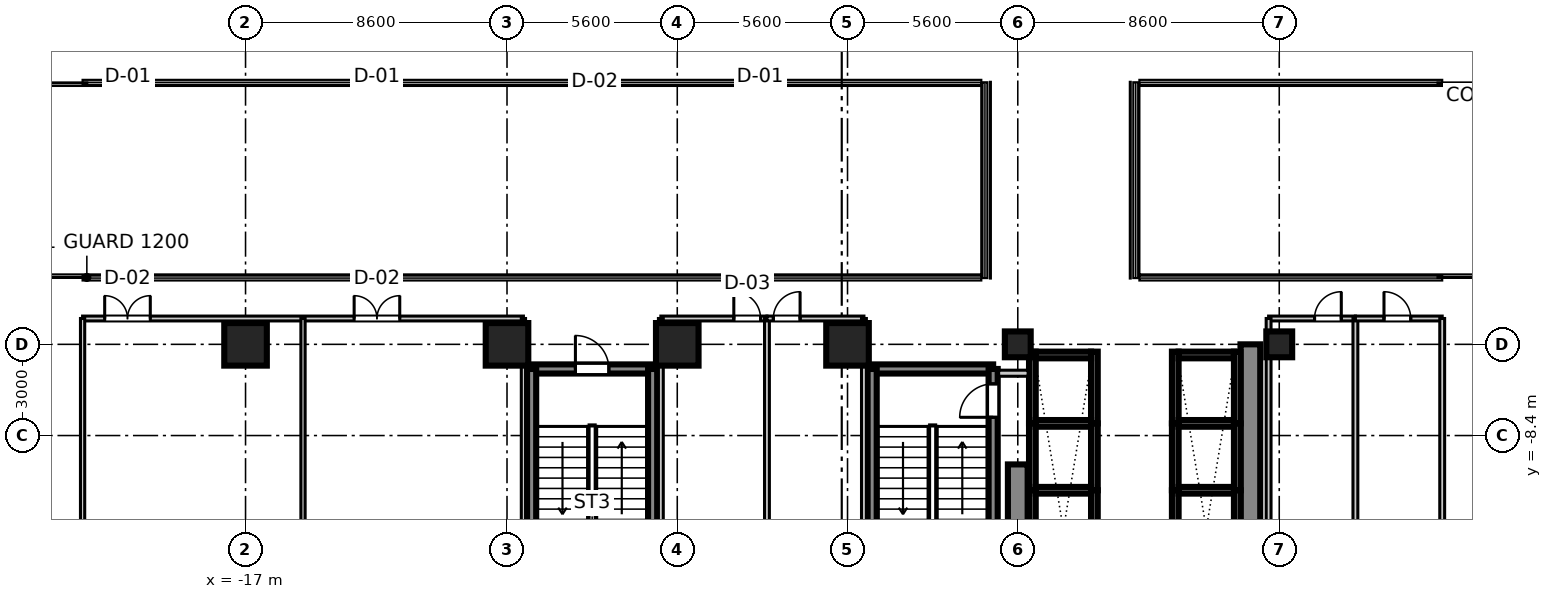
"""IFC4 building model, lengths in metres.
Left out: names, types, materials, properties, quantities, classifications, styles, units other than length and angle.
Written with IfcOpenShell. Run it as: python <this file> out.ifc"""

import sys

from ifc_helpers import new_model, si_unit, direction, frame, frame_2d, origin, origin_2d, place, context, subcontext, project, spatial, rectangle, extrude, source, transform, mapped, element, fill, save


model = new_model("IFC4")
c1 = context("Model", 3, precision=1e-05, world=origin(), true_north=direction((0.0, 1.0)))
c2 = subcontext(c1, "Body", "Model", "MODEL_VIEW")
j1 = project(units=[si_unit("LENGTHUNIT", "METRE"), si_unit("PLANEANGLEUNIT", "RADIAN")], contexts=[c1])
p1 = place(None, origin())
s1 = spatial("IfcSite", under=j1, at=p1, CompositionType="ELEMENT")
p2 = place(p1, origin())
s2 = spatial("IfcBuilding", under=s1, at=p2, CompositionType="ELEMENT")
p3 = place(p2, frame((0.0, 0.0, 61.6)))
s3 = spatial("IfcBuildingStorey", under=s2, at=p3, CompositionType="ELEMENT", Elevation=61.6)
m1 = source(origin(), c2, "Body", "SweptSolid", [
    extrude(rectangle(XDim=1.4, YDim=1.4, at=origin_2d()), origin(), (0.0, 0.0, 1.0), 3.605),
])
for number, where, z_axis, x_axis in (
    (1, (-17.0, -5.4, 0.0), (0.0, 0.0, 1.0), (1.0, 0.0, 0.0)),
    (2, (-8.4, -5.4, 0.0), (0.0, 0.0, 1.0), (1.0, 0.0, 0.0)),
    (3, (-2.8, -5.4, 0.0), (0.0, 0.0, 1.0), (1.0, 0.0, 0.0)),
    (4, (2.8, -5.4, 0.0), (0.0, 0.0, 1.0), (1.0, 0.0, 0.0)),
):
    element("IfcColumn", number, at=place(p3, frame(where, z_axis=z_axis, x_axis=x_axis)), inside=s3, PredefinedType="COLUMN", context=c2, shape_type="MappedRepresentation", body=[
        mapped(m1, transform((0.0, 0.0, 0.0), scale=1.0)),
    ])
m2 = source(origin(), c2, "Body", "SweptSolid", [
    extrude(rectangle(XDim=0.85, YDim=0.85, at=origin_2d()), origin(), (0.0, 0.0, 1.0), 3.605),
])
for number, where, z_axis, x_axis in (
    (5, (8.4, -5.4, 0.0), (0.0, 0.0, 1.0), (1.0, 0.0, 0.0)),
    (6, (17.0, -5.4, 0.0), (0.0, 0.0, 1.0), (1.0, 0.0, 0.0)),
):
    element("IfcColumn", number, at=place(p3, frame(where, z_axis=z_axis, x_axis=x_axis)), inside=s3, PredefinedType="PILASTER", context=c2, shape_type="MappedRepresentation", body=[
        mapped(m2, transform((0.0, 0.0, 0.0), scale=1.0)),
    ])
m3 = source(origin(), c2, "Body", "SweptSolid", [
    extrude(rectangle(XDim=7.65, YDim=0.65, at=frame_2d((3.825, 0.0))), origin(), (0.0, 0.0, 1.0), 3.37),
])
p4 = place(p3, frame((8.4, -17.0, 0.0), z_axis=(0.0, 0.0, 1.0), x_axis=(0.0, 1.0, 0.0)))
e7 = element("IfcWall", 7, at=p4, inside=s3, PredefinedType="SHEAR", context=c2, shape_type="MappedRepresentation", body=[
    mapped(m3, transform((0.0, 0.0, 0.0), scale=1.0)),
])
m4 = source(origin(), c2, "Body", "SweptSolid", [
    extrude(rectangle(XDim=11.6, YDim=0.65, at=frame_2d((5.8, 0.0))), origin(), (0.0, 0.0, 1.0), 3.37),
])
p5 = place(p3, frame((16.05, -17.0, 0.0), z_axis=(0.0, 0.0, 1.0), x_axis=(0.0, 1.0, 0.0)))
e8 = element("IfcWall", 8, at=p5, inside=s3, PredefinedType="SHEAR", context=c2, shape_type="MappedRepresentation", body=[
    mapped(m4, transform((0.0, 0.0, 0.0), scale=1.0)),
])
m5 = source(origin(), c2, "Body", "SweptSolid", [
    extrude(rectangle(XDim=3.98, YDim=0.3, at=frame_2d((1.99, 0.0))), origin(), (0.0, 0.0, 1.0), 3.37),
])
p6 = place(p3, frame((3.61, -6.21, 0.0), z_axis=(0.0, 0.0, 1.0), x_axis=(1.0, 0.0, 0.0)))
e9 = element("IfcWall", 9, at=p6, inside=s3, PredefinedType="SHEAR", context=c2, shape_type="MappedRepresentation", body=[
    mapped(m5, transform((0.0, 0.0, 0.0), scale=1.0)),
])
m6 = source(origin(), c2, "Body", "SweptSolid", [
    extrude(rectangle(XDim=9.38, YDim=0.3, at=frame_2d((4.69, 0.0))), origin(), (0.0, 0.0, 1.0), 3.37),
])
p7 = place(p3, frame((3.61, -15.59, 0.0), z_axis=(0.0, 0.0, 1.0), x_axis=(0.0, 1.0, 0.0)))
e10 = element("IfcWall", 10, at=p7, inside=s3, PredefinedType="SHEAR", context=c2, shape_type="MappedRepresentation", body=[
    mapped(m6, transform((0.0, 0.0, 0.0), scale=1.0)),
])
p8 = place(p3, frame((7.59, -15.59, 0.0), z_axis=(0.0, 0.0, 1.0), x_axis=(0.0, 1.0, 0.0)))
e11 = element("IfcWall", 11, at=p8, inside=s3, PredefinedType="SHEAR", context=c2, shape_type="MappedRepresentation", body=[
    mapped(m6, transform((0.0, 0.0, 0.0), scale=1.0)),
])
p9 = place(p8, frame((7.79, 0.0, 0.0)))
e12 = element("IfcOpeningElement", 12, at=p9, cuts=e11, PredefinedType="OPENING", context=c2, shape_type="SweptSolid", body=[
    extrude(rectangle(XDim=1.1, YDim=2.15, at=frame_2d((0.55, 1.075))), frame((0.0, 0.16, 0.0), z_axis=(0.0, -1.0, 0.0), x_axis=(1.0, 0.0, 0.0)), (0.0, 0.0, 1.0), 0.32),
])
p10 = place(p3, frame((-7.59, -6.21, 0.0), z_axis=(0.0, 0.0, 1.0), x_axis=(1.0, 0.0, 0.0)))
e13 = element("IfcWall", 13, at=p10, inside=s3, PredefinedType="SHEAR", context=c2, shape_type="MappedRepresentation", body=[
    mapped(m5, transform((0.0, 0.0, 0.0), scale=1.0)),
])
p11 = place(p10, frame((1.44, 0.0, 0.0)))
e14 = element("IfcOpeningElement", 14, at=p11, cuts=e13, PredefinedType="OPENING", context=c2, shape_type="SweptSolid", body=[
    extrude(rectangle(XDim=1.1, YDim=2.15, at=frame_2d((0.55, 1.075))), frame((0.0, 0.16, 0.0), z_axis=(0.0, -1.0, 0.0), x_axis=(1.0, 0.0, 0.0)), (0.0, 0.0, 1.0), 0.32),
])
for number, where, z_axis, x_axis in (
    (15, (-7.59, -15.59, 0.0), (0.0, 0.0, 1.0), (0.0, 1.0, 0.0)),
    (16, (-3.61, -15.59, 0.0), (0.0, 0.0, 1.0), (0.0, 1.0, 0.0)),
):
    element("IfcWall", number, at=place(p3, frame(where, z_axis=z_axis, x_axis=x_axis)), inside=s3, PredefinedType="SHEAR", context=c2, shape_type="MappedRepresentation", body=[
        mapped(m6, transform((0.0, 0.0, 0.0), scale=1.0)),
    ])
m7 = source(origin(), c2, "Body", "SweptSolid", [
    extrude(rectangle(XDim=2.36, YDim=0.22, at=frame_2d((1.18, 0.0))), origin(), (0.0, 0.0, 1.0), 3.37),
])
for number, where, z_axis, x_axis in (
    (17, (13.58, -8.0, 0.0), (0.0, 0.0, 1.0), (0.0, 1.0, 0.0)),
    (18, (15.62, -8.0, 0.0), (0.0, 0.0, 1.0), (0.0, 1.0, 0.0)),
):
    element("IfcWall", number, at=place(p3, frame(where, z_axis=z_axis, x_axis=x_axis)), inside=s3, PredefinedType="SHEAR", context=c2, shape_type="MappedRepresentation", body=[
        mapped(m7, transform((0.0, 0.0, 0.0), scale=1.0)),
    ])
m8 = source(origin(), c2, "Body", "SweptSolid", [
    extrude(rectangle(XDim=1.82, YDim=0.22, at=frame_2d((0.91, 0.0))), origin(), (0.0, 0.0, 1.0), 3.37),
])
p12 = place(p3, frame((13.69, -5.75, 0.0), z_axis=(0.0, 0.0, 1.0), x_axis=(1.0, 0.0, 0.0)))
e19 = element("IfcWall", 19, at=p12, inside=s3, PredefinedType="SHEAR", context=c2, shape_type="MappedRepresentation", body=[
    mapped(m8, transform((0.0, 0.0, 0.0), scale=1.0)),
])
m9 = source(origin(), c2, "Body", "SweptSolid", [
    extrude(rectangle(XDim=2.2, YDim=0.22, at=frame_2d((1.1, 0.0))), origin(), (0.0, 0.0, 1.0), 3.37),
])
for number, where, z_axis, x_axis in (
    (20, (13.58, -10.2, 0.0), (0.0, 0.0, 1.0), (0.0, 1.0, 0.0)),
    (21, (15.62, -10.2, 0.0), (0.0, 0.0, 1.0), (0.0, 1.0, 0.0)),
):
    element("IfcWall", number, at=place(p3, frame(where, z_axis=z_axis, x_axis=x_axis)), inside=s3, PredefinedType="SHEAR", context=c2, shape_type="MappedRepresentation", body=[
        mapped(m9, transform((0.0, 0.0, 0.0), scale=1.0)),
    ])
m10 = source(origin(), c2, "Body", "SweptSolid", [
    extrude(rectangle(XDim=1.82, YDim=0.22, at=frame_2d((0.91, 0.0))), origin(), (0.0, 0.0, 1.0), 3.65),
])
p13 = place(p3, frame((13.69, -8.0, 0.0), z_axis=(0.0, 0.0, 1.0), x_axis=(1.0, 0.0, 0.0)))
e22 = element("IfcWall", 22, at=p13, inside=s3, PredefinedType="SHEAR", context=c2, shape_type="MappedRepresentation", body=[
    mapped(m10, transform((0.0, 0.0, 0.0), scale=1.0)),
])
for number, where, z_axis, x_axis in (
    (23, (13.58, -12.4, 0.0), (0.0, 0.0, 1.0), (0.0, 1.0, 0.0)),
    (24, (15.62, -12.4, 0.0), (0.0, 0.0, 1.0), (0.0, 1.0, 0.0)),
):
    element("IfcWall", number, at=place(p3, frame(where, z_axis=z_axis, x_axis=x_axis)), inside=s3, PredefinedType="SHEAR", context=c2, shape_type="MappedRepresentation", body=[
        mapped(m9, transform((0.0, 0.0, 0.0), scale=1.0)),
    ])
p14 = place(p3, frame((13.69, -10.2, 0.0), z_axis=(0.0, 0.0, 1.0), x_axis=(1.0, 0.0, 0.0)))
e25 = element("IfcWall", 25, at=p14, inside=s3, PredefinedType="SHEAR", context=c2, shape_type="MappedRepresentation", body=[
    mapped(m10, transform((0.0, 0.0, 0.0), scale=1.0)),
])
for number, where, z_axis, x_axis in (
    (26, (8.88, -8.0, 0.0), (0.0, 0.0, 1.0), (0.0, 1.0, 0.0)),
    (27, (10.92, -8.0, 0.0), (0.0, 0.0, 1.0), (0.0, 1.0, 0.0)),
):
    element("IfcWall", number, at=place(p3, frame(where, z_axis=z_axis, x_axis=x_axis)), inside=s3, PredefinedType="SHEAR", context=c2, shape_type="MappedRepresentation", body=[
        mapped(m7, transform((0.0, 0.0, 0.0), scale=1.0)),
    ])
p15 = place(p3, frame((8.99, -5.75, 0.0), z_axis=(0.0, 0.0, 1.0), x_axis=(1.0, 0.0, 0.0)))
e28 = element("IfcWall", 28, at=p15, inside=s3, PredefinedType="SHEAR", context=c2, shape_type="MappedRepresentation", body=[
    mapped(m8, transform((0.0, 0.0, 0.0), scale=1.0)),
])
for number, where, z_axis, x_axis in (
    (29, (8.88, -10.2, 0.0), (0.0, 0.0, 1.0), (0.0, 1.0, 0.0)),
    (30, (10.92, -10.2, 0.0), (0.0, 0.0, 1.0), (0.0, 1.0, 0.0)),
):
    element("IfcWall", number, at=place(p3, frame(where, z_axis=z_axis, x_axis=x_axis)), inside=s3, PredefinedType="SHEAR", context=c2, shape_type="MappedRepresentation", body=[
        mapped(m9, transform((0.0, 0.0, 0.0), scale=1.0)),
    ])
p16 = place(p3, frame((8.99, -8.0, 0.0), z_axis=(0.0, 0.0, 1.0), x_axis=(1.0, 0.0, 0.0)))
e31 = element("IfcWall", 31, at=p16, inside=s3, PredefinedType="SHEAR", context=c2, shape_type="MappedRepresentation", body=[
    mapped(m10, transform((0.0, 0.0, 0.0), scale=1.0)),
])
for number, where, z_axis, x_axis in (
    (32, (8.88, -12.4, 0.0), (0.0, 0.0, 1.0), (0.0, 1.0, 0.0)),
    (33, (10.92, -12.4, 0.0), (0.0, 0.0, 1.0), (0.0, 1.0, 0.0)),
):
    element("IfcWall", number, at=place(p3, frame(where, z_axis=z_axis, x_axis=x_axis)), inside=s3, PredefinedType="SHEAR", context=c2, shape_type="MappedRepresentation", body=[
        mapped(m9, transform((0.0, 0.0, 0.0), scale=1.0)),
    ])
p17 = place(p3, frame((8.99, -10.2, 0.0), z_axis=(0.0, 0.0, 1.0), x_axis=(1.0, 0.0, 0.0)))
e34 = element("IfcWall", 34, at=p17, inside=s3, PredefinedType="SHEAR", context=c2, shape_type="MappedRepresentation", body=[
    mapped(m10, transform((0.0, 0.0, 0.0), scale=1.0)),
])
m11 = source(origin(), c2, "Body", "SweptSolid", [
    extrude(rectangle(XDim=0.97, YDim=0.2, at=frame_2d((0.485, 0.0))), origin(), (0.0, 0.0, 1.0), 2.71),
])
p18 = place(p3, frame((7.77, -6.35, 0.0), z_axis=(0.0, 0.0, 1.0), x_axis=(1.0, 0.0, 0.0)))
e35 = element("IfcWall", 35, at=p18, inside=s3, PredefinedType="PARTITIONING", context=c2, shape_type="MappedRepresentation", body=[
    mapped(m11, transform((0.0, 0.0, 0.0), scale=1.0)),
])
m12 = source(origin(), c2, "Body", "SweptSolid", [
    extrude(rectangle(XDim=2.855, YDim=0.16, at=frame_2d((1.427, 0.0))), origin(), (0.0, 0.0, 1.0), 2.71),
])
p19 = place(p3, frame((16.65, -4.55, 0.0), z_axis=(0.0, 0.0, 1.0), x_axis=(1.0, 0.0, 0.0)))
e36 = element("IfcWall", 36, at=p19, inside=s3, PredefinedType="PARTITIONING", context=c2, shape_type="MappedRepresentation", body=[
    mapped(m12, transform((0.0, 0.0, 0.0), scale=1.0)),
])
p20 = place(p19, frame((1.511, 0.0, 0.0)))
e37 = element("IfcOpeningElement", 37, at=p20, cuts=e36, PredefinedType="OPENING", context=c2, shape_type="SweptSolid", body=[
    extrude(rectangle(XDim=0.88, YDim=2.1, at=frame_2d((0.44, 1.05))), frame((0.0, 0.09, 0.0), z_axis=(0.0, -1.0, 0.0), x_axis=(1.0, 0.0, 0.0)), (0.0, 0.0, 1.0), 0.18),
])
m13 = source(origin(), c2, "Body", "SweptSolid", [
    extrude(rectangle(XDim=20.55, YDim=0.16, at=frame_2d((10.275, 0.0))), origin(), (0.0, 0.0, 1.0), 2.71),
])
for number, where, z_axis, x_axis in (
    (38, (16.65, -25.1, 0.0), (0.0, 0.0, 1.0), (0.0, 1.0, 0.0)),
    (39, (19.505, -25.1, 0.0), (0.0, 0.0, 1.0), (0.0, 1.0, 0.0)),
):
    element("IfcWall", number, at=place(p3, frame(where, z_axis=z_axis, x_axis=x_axis)), inside=s3, PredefinedType="PARTITIONING", context=c2, shape_type="MappedRepresentation", body=[
        mapped(m13, transform((0.0, 0.0, 0.0), scale=1.0)),
    ])
m14 = source(origin(), c2, "Body", "SweptSolid", [
    extrude(rectangle(XDim=2.855, YDim=0.16, at=frame_2d((1.428, 0.0))), origin(), (0.0, 0.0, 1.0), 2.71),
])
p21 = place(p3, frame((19.505, -4.55, 0.0), z_axis=(0.0, 0.0, 1.0), x_axis=(1.0, 0.0, 0.0)))
e40 = element("IfcWall", 40, at=p21, inside=s3, PredefinedType="PARTITIONING", context=c2, shape_type="MappedRepresentation", body=[
    mapped(m14, transform((0.0, 0.0, 0.0), scale=1.0)),
])
p22 = place(p21, frame((0.94, 0.0, 0.0)))
e41 = element("IfcOpeningElement", 41, at=p22, cuts=e40, PredefinedType="OPENING", context=c2, shape_type="SweptSolid", body=[
    extrude(rectangle(XDim=0.88, YDim=2.1, at=frame_2d((0.44, 1.05))), frame((0.0, 0.09, 0.0), z_axis=(0.0, -1.0, 0.0), x_axis=(1.0, 0.0, 0.0)), (0.0, 0.0, 1.0), 0.18),
])
m15 = source(origin(), c2, "Body", "SweptSolid", [
    extrude(rectangle(XDim=19.13, YDim=0.16, at=frame_2d((9.565, 0.0))), origin(), (0.0, 0.0, 1.0), 2.71),
])
p23 = place(p3, frame((22.36, -23.68, 0.0), z_axis=(0.0, 0.0, 1.0), x_axis=(0.0, 1.0, 0.0)))
e42 = element("IfcWall", 42, at=p23, inside=s3, PredefinedType="PARTITIONING", context=c2, shape_type="MappedRepresentation", body=[
    mapped(m15, transform((0.0, 0.0, 0.0), scale=1.0)),
])
m16 = source(origin(), c2, "Body", "SweptSolid", [
    extrude(rectangle(XDim=14.5, YDim=0.16, at=frame_2d((7.25, 0.0))), origin(), (0.0, 0.0, 1.0), 2.71),
])
p24 = place(p3, frame((-22.36, -4.55, 0.0), z_axis=(0.0, 0.0, 1.0), x_axis=(1.0, 0.0, 0.0)))
e43 = element("IfcWall", 43, at=p24, inside=s3, PredefinedType="PARTITIONING", context=c2, shape_type="MappedRepresentation", body=[
    mapped(m16, transform((0.0, 0.0, 0.0), scale=1.0)),
])
p25 = place(p24, frame((0.727, 0.0, 0.0)))
e44 = element("IfcOpeningElement", 44, at=p25, cuts=e43, PredefinedType="OPENING", context=c2, shape_type="SweptSolid", body=[
    extrude(rectangle(XDim=1.5, YDim=2.15, at=frame_2d((0.75, 1.075))), frame((0.0, 0.09, 0.0), z_axis=(0.0, -1.0, 0.0), x_axis=(1.0, 0.0, 0.0)), (0.0, 0.0, 1.0), 0.18),
])
p26 = place(p24, frame((8.932, 0.0, 0.0)))
e45 = element("IfcOpeningElement", 45, at=p26, cuts=e43, PredefinedType="OPENING", context=c2, shape_type="SweptSolid", body=[
    extrude(rectangle(XDim=1.5, YDim=2.15, at=frame_2d((0.75, 1.075))), frame((0.0, 0.09, 0.0), z_axis=(0.0, -1.0, 0.0), x_axis=(1.0, 0.0, 0.0)), (0.0, 0.0, 1.0), 0.18),
])
m17 = source(origin(), c2, "Body", "SweptSolid", [
    extrude(rectangle(XDim=19.13, YDim=0.14, at=frame_2d((9.565, 0.0))), origin(), (0.0, 0.0, 1.0), 2.71),
])
p27 = place(p3, frame((-22.36, -23.68, 0.0), z_axis=(0.0, 0.0, 1.0), x_axis=(0.0, 1.0, 0.0)))
e46 = element("IfcWall", 46, at=p27, inside=s3, PredefinedType="PARTITIONING", context=c2, shape_type="MappedRepresentation", body=[
    mapped(m17, transform((0.0, 0.0, 0.0), scale=1.0)),
])
m18 = source(origin(), c2, "Body", "SweptSolid", [
    extrude(rectangle(XDim=20.55, YDim=0.14, at=frame_2d((10.275, 0.0))), origin(), (0.0, 0.0, 1.0), 2.71),
])
for number, where, z_axis, x_axis in (
    (47, (-7.86, -25.1, 0.0), (0.0, 0.0, 1.0), (0.0, 1.0, 0.0)),
    (48, (-15.11, -25.1, 0.0), (0.0, 0.0, 1.0), (0.0, 1.0, 0.0)),
):
    element("IfcWall", number, at=place(p3, frame(where, z_axis=z_axis, x_axis=x_axis)), inside=s3, PredefinedType="PARTITIONING", context=c2, shape_type="MappedRepresentation", body=[
        mapped(m18, transform((0.0, 0.0, 0.0), scale=1.0)),
    ])
m19 = source(origin(), c2, "Body", "SweptSolid", [
    extrude(rectangle(XDim=3.49, YDim=0.16, at=frame_2d((1.745, 0.0))), origin(), (0.0, 0.0, 1.0), 2.71),
])
p28 = place(p3, frame((-3.34, -4.55, 0.0), z_axis=(0.0, 0.0, 1.0), x_axis=(1.0, 0.0, 0.0)))
e49 = element("IfcWall", 49, at=p28, inside=s3, PredefinedType="PARTITIONING", context=c2, shape_type="MappedRepresentation", body=[
    mapped(m19, transform((0.0, 0.0, 0.0), scale=1.0)),
])
p29 = place(p28, frame((2.4, 0.0, 0.0)))
e50 = element("IfcOpeningElement", 50, at=p29, cuts=e49, PredefinedType="OPENING", context=c2, shape_type="SweptSolid", body=[
    extrude(rectangle(XDim=0.88, YDim=2.1, at=frame_2d((0.44, 1.05))), frame((0.0, 0.09, 0.0), z_axis=(0.0, -1.0, 0.0), x_axis=(1.0, 0.0, 0.0)), (0.0, 0.0, 1.0), 0.18),
])
for number, where, z_axis, x_axis in (
    (51, (-3.34, -25.1, 0.0), (0.0, 0.0, 1.0), (0.0, 1.0, 0.0)),
    (52, (0.15, -25.1, 0.0), (0.0, 0.0, 1.0), (0.0, 1.0, 0.0)),
):
    element("IfcWall", number, at=place(p3, frame(where, z_axis=z_axis, x_axis=x_axis)), inside=s3, PredefinedType="PARTITIONING", context=c2, shape_type="MappedRepresentation", body=[
        mapped(m13, transform((0.0, 0.0, 0.0), scale=1.0)),
    ])
m20 = source(origin(), c2, "Body", "SweptSolid", [
    extrude(rectangle(XDim=3.19, YDim=0.16, at=frame_2d((1.595, 0.0))), origin(), (0.0, 0.0, 1.0), 2.71),
])
p30 = place(p3, frame((0.15, -4.55, 0.0), z_axis=(0.0, 0.0, 1.0), x_axis=(1.0, 0.0, 0.0)))
e53 = element("IfcWall", 53, at=p30, inside=s3, PredefinedType="PARTITIONING", context=c2, shape_type="MappedRepresentation", body=[
    mapped(m20, transform((0.0, 0.0, 0.0), scale=1.0)),
])
p31 = place(p30, frame((0.21, 0.0, 0.0)))
e54 = element("IfcOpeningElement", 54, at=p31, cuts=e53, PredefinedType="OPENING", context=c2, shape_type="SweptSolid", body=[
    extrude(rectangle(XDim=0.88, YDim=2.1, at=frame_2d((0.44, 1.05))), frame((0.0, 0.09, 0.0), z_axis=(0.0, -1.0, 0.0), x_axis=(1.0, 0.0, 0.0)), (0.0, 0.0, 1.0), 0.18),
])
p32 = place(p3, frame((3.34, -25.1, 0.0), z_axis=(0.0, 0.0, 1.0), x_axis=(0.0, 1.0, 0.0)))
e55 = element("IfcWall", 55, at=p32, inside=s3, PredefinedType="PARTITIONING", context=c2, shape_type="MappedRepresentation", body=[
    mapped(m13, transform((0.0, 0.0, 0.0), scale=1.0)),
])
m21 = source(origin(), c2, "Body", "SweptSolid", [
    extrude(rectangle(XDim=1.1, YDim=2.15, at=frame_2d((0.55, 1.075))), frame((0.0, 0.025, 0.0), z_axis=(0.0, -1.0, 0.0), x_axis=(1.0, 0.0, 0.0)), (0.0, 0.0, 1.0), 0.05),
])
p33 = place(p9, origin())
e56 = element("IfcDoor", 56, at=p33, inside=s3, OperationType="SINGLE_SWING_LEFT", PredefinedType="DOOR", context=c2, shape_type="MappedRepresentation", body=[
    mapped(m21, transform((0.0, 0.0, 0.0), scale=1.0)),
])
fill(e12, e56)
p34 = place(p11, frame((1.1, 0.0, 0.0), z_axis=(0.0, 0.0, 1.0), x_axis=(-1.0, 0.0, 0.0)))
e57 = element("IfcDoor", 57, at=p34, inside=s3, OperationType="SINGLE_SWING_LEFT", PredefinedType="DOOR", context=c2, shape_type="MappedRepresentation", body=[
    mapped(m21, transform((0.0, 0.0, 0.0), scale=1.0)),
])
fill(e14, e57)
m22 = source(origin(), c2, "Body", "SweptSolid", [
    extrude(rectangle(XDim=0.88, YDim=2.1, at=frame_2d((0.44, 1.05))), frame((0.0, 0.025, 0.0), z_axis=(0.0, -1.0, 0.0), x_axis=(1.0, 0.0, 0.0)), (0.0, 0.0, 1.0), 0.05),
])
p35 = place(p20, frame((0.88, 0.0, 0.0), z_axis=(0.0, 0.0, 1.0), x_axis=(-1.0, 0.0, 0.0)))
e58 = element("IfcDoor", 58, at=p35, inside=s3, OperationType="SINGLE_SWING_RIGHT", PredefinedType="DOOR", context=c2, shape_type="MappedRepresentation", body=[
    mapped(m22, transform((0.0, 0.0, 0.0), scale=1.0)),
])
fill(e37, e58)
p36 = place(p22, frame((0.88, 0.0, 0.0), z_axis=(0.0, 0.0, 1.0), x_axis=(-1.0, 0.0, 0.0)))
e59 = element("IfcDoor", 59, at=p36, inside=s3, OperationType="SINGLE_SWING_LEFT", PredefinedType="DOOR", context=c2, shape_type="MappedRepresentation", body=[
    mapped(m22, transform((0.0, 0.0, 0.0), scale=1.0)),
])
fill(e41, e59)
m23 = source(origin(), c2, "Body", "SweptSolid", [
    extrude(rectangle(XDim=1.5, YDim=2.15, at=frame_2d((0.75, 1.075))), frame((0.0, 0.025, 0.0), z_axis=(0.0, -1.0, 0.0), x_axis=(1.0, 0.0, 0.0)), (0.0, 0.0, 1.0), 0.05),
])
p37 = place(p25, frame((1.5, 0.0, 0.0), z_axis=(0.0, 0.0, 1.0), x_axis=(-1.0, 0.0, 0.0)))
e60 = element("IfcDoor", 60, at=p37, inside=s3, OperationType="DOUBLE_DOOR_SINGLE_SWING", PredefinedType="DOOR", context=c2, shape_type="MappedRepresentation", body=[
    mapped(m23, transform((0.0, 0.0, 0.0), scale=1.0)),
])
fill(e44, e60)
p38 = place(p26, frame((1.5, 0.0, 0.0), z_axis=(0.0, 0.0, 1.0), x_axis=(-1.0, 0.0, 0.0)))
e61 = element("IfcDoor", 61, at=p38, inside=s3, OperationType="DOUBLE_DOOR_SINGLE_SWING", PredefinedType="DOOR", context=c2, shape_type="MappedRepresentation", body=[
    mapped(m23, transform((0.0, 0.0, 0.0), scale=1.0)),
])
fill(e45, e61)
p39 = place(p29, frame((0.88, 0.0, 0.0), z_axis=(0.0, 0.0, 1.0), x_axis=(-1.0, 0.0, 0.0)))
e62 = element("IfcDoor", 62, at=p39, inside=s3, OperationType="SINGLE_SWING_LEFT", PredefinedType="DOOR", context=c2, shape_type="MappedRepresentation", body=[
    mapped(m22, transform((0.0, 0.0, 0.0), scale=1.0)),
])
fill(e50, e62)
p40 = place(p31, frame((0.88, 0.0, 0.0), z_axis=(0.0, 0.0, 1.0), x_axis=(-1.0, 0.0, 0.0)))
e63 = element("IfcDoor", 63, at=p40, inside=s3, OperationType="SINGLE_SWING_RIGHT", PredefinedType="DOOR", context=c2, shape_type="MappedRepresentation", body=[
    mapped(m22, transform((0.0, 0.0, 0.0), scale=1.0)),
])
fill(e54, e63)
save(model, sys.argv[1])
